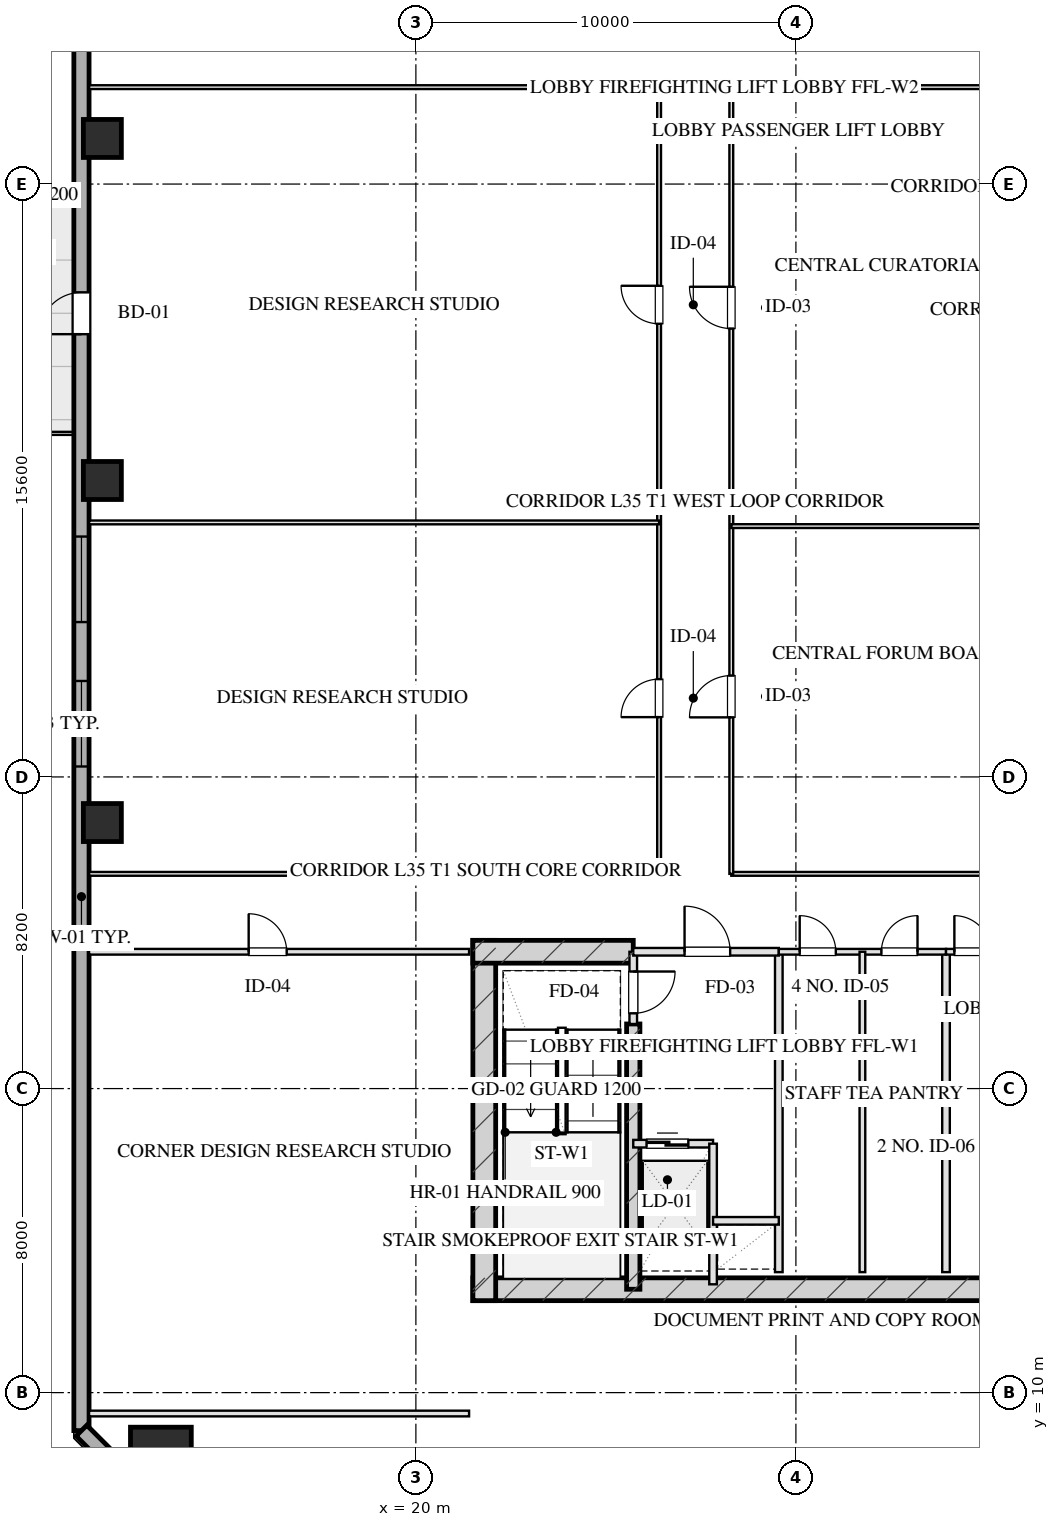
"""IFC4 building model, lengths in metres.
Left out: names, types, materials, properties, quantities, classifications, styles, units other than length and angle.
Written with IfcOpenShell. Run it as: python <this file> out.ifc"""

import sys

from ifc_helpers import new_model, si_unit, direction, frame, frame_2d, origin, origin_2d, place, context, subcontext, project, spatial, rectangle, hollow_rectangle, extrude, element, fill, save


model = new_model("IFC4")
c1 = context("Model", 3, precision=1e-05, world=origin(), true_north=direction((0.0, 1.0)))
c2 = subcontext(c1, "Body", "Model", "MODEL_VIEW")
j1 = project(units=[si_unit("LENGTHUNIT", "METRE"), si_unit("PLANEANGLEUNIT", "RADIAN")], contexts=[c1])
p1 = place(None, origin())
s1 = spatial("IfcSite", under=j1, at=p1, CompositionType="ELEMENT")
p2 = place(p1, origin())
s2 = spatial("IfcBuilding", under=s1, at=p2, CompositionType="ELEMENT")
p3 = place(p2, frame((0.0, 0.0, 134.55)))
s3 = spatial("IfcBuildingStorey", under=s2, at=p3, CompositionType="ELEMENT", Elevation=134.55)
p4 = place(p3, frame((21.5, 12.72, 0.0), z_axis=(0.0, 0.0, 1.0), x_axis=(1.0, 0.0, 0.0)))
e1 = element("IfcWall", 1, at=p4, inside=s3, PredefinedType="SHEAR", context=c2, shape_type="SweptSolid", body=[
    extrude(rectangle(XDim=17.0, YDim=0.6, at=frame_2d((8.5, 0.0))), origin(), (0.0, 0.0, 1.0), 3.45),
])
p5 = place(p3, frame((21.8, 21.9, 0.0), z_axis=(0.0, 0.0, 1.0), x_axis=(0.0, -1.0, 0.0)))
e2 = element("IfcWall", 2, at=p5, inside=s3, PredefinedType="SHEAR", context=c2, shape_type="SweptSolid", body=[
    extrude(rectangle(XDim=9.48, YDim=0.6, at=frame_2d((4.74, 0.0))), origin(), (0.0, 0.0, 1.0), 3.45),
])
p6 = place(p3, frame((25.72, 19.7, 0.0), z_axis=(0.0, 0.0, 1.0), x_axis=(0.0, -1.0, 0.0)))
e3 = element("IfcWall", 3, at=p6, inside=s3, PredefinedType="SHEAR", context=c2, shape_type="SweptSolid", body=[
    extrude(rectangle(XDim=6.98, YDim=0.35, at=frame_2d((3.49, 0.0))), origin(), (0.0, 0.0, 1.0), 3.45),
])
p7 = place(p3, frame((21.5, 21.6, 0.0), z_axis=(0.0, 0.0, 1.0), x_axis=(1.0, 0.0, 0.0)))
e4 = element("IfcWall", 4, at=p7, inside=s3, PredefinedType="SHEAR", context=c2, shape_type="SweptSolid", body=[
    extrude(rectangle(XDim=4.22, YDim=0.6, at=frame_2d((2.11, 0.0))), origin(), (0.0, 0.0, 1.0), 3.45),
])
p8 = place(p3, frame((13.29, 8.29, 0.0), z_axis=(0.0, 0.0, 1.0), x_axis=(1.0, 0.0, 0.0)))
e5 = element("IfcColumn", 5, at=p8, inside=s3, PredefinedType="COLUMN", context=c2, shape_type="SweptSolid", body=[
    extrude(hollow_rectangle(XDim=1.6, YDim=1.6, WallThickness=0.055, at=origin_2d()), origin(), (0.0, 0.0, 1.0), 3.451),
])
for number, where, z_axis, x_axis in (
    (6, (11.75, 25.0, 0.0), (0.0, 0.0, 1.0), (1.0, 0.0, 0.0)),
    (7, (11.75, 34.0, 0.0), (0.0, 0.0, 1.0), (1.0, 0.0, 0.0)),
    (8, (11.75, 43.0, 0.0), (0.0, 0.0, 1.0), (1.0, 0.0, 0.0)),
):
    element("IfcColumn", number, at=place(p3, frame(where, z_axis=z_axis, x_axis=x_axis)), inside=s3, PredefinedType="COLUMN", context=c2, shape_type="SweptSolid", body=[
        extrude(hollow_rectangle(XDim=1.0, YDim=1.0, WallThickness=0.036, at=origin_2d()), origin(), (0.0, 0.0, 1.0), 3.451),
    ])
p9 = place(p3, frame((11.2, 9.0, 0.0), z_axis=(0.0, 0.0, 1.0), x_axis=(0.0, 1.0, 0.0)))
e9 = element("IfcWall", 9, at=p9, inside=s3, PredefinedType="SOLIDWALL", context=c2, shape_type="SweptSolid", body=[
    extrude(rectangle(XDim=50.0, YDim=0.4, at=frame_2d((25.0, 0.0))), origin(), (0.0, 0.0, 1.0), 2.55),
])
p10 = place(p9, frame((17.475, 0.0, 0.75)))
e10 = element("IfcOpeningElement", 10, at=p10, cuts=e9, PredefinedType="OPENING", context=c2, shape_type="SweptSolid", body=[
    extrude(rectangle(XDim=2.25, YDim=1.4, at=frame_2d((1.125, 0.7))), frame((0.0, 0.21, 0.0), z_axis=(0.0, -1.0, 0.0), x_axis=(1.0, 0.0, 0.0)), (0.0, 0.0, 1.0), 0.42),
])
p11 = place(p9, frame((21.275, 0.0, 0.75)))
e11 = element("IfcOpeningElement", 11, at=p11, cuts=e9, PredefinedType="OPENING", context=c2, shape_type="SweptSolid", body=[
    extrude(rectangle(XDim=2.25, YDim=1.4, at=frame_2d((1.125, 0.7))), frame((0.0, 0.21, 0.0), z_axis=(0.0, -1.0, 0.0), x_axis=(1.0, 0.0, 0.0)), (0.0, 0.0, 1.0), 0.42),
])
p12 = place(p9, frame((28.85, 0.0, 0.0)))
e12 = element("IfcOpeningElement", 12, at=p12, cuts=e9, PredefinedType="OPENING", context=c2, shape_type="SweptSolid", body=[
    extrude(rectangle(XDim=1.1, YDim=2.15, at=frame_2d((0.55, 1.075))), frame((0.0, 0.21, 0.0), z_axis=(0.0, -1.0, 0.0), x_axis=(1.0, 0.0, 0.0)), (0.0, 0.0, 1.0), 0.42),
])
p13 = place(p3, frame((14.0, 6.2, 0.0), z_axis=(0.0, 0.0, 1.0), x_axis=(-0.707106781187, 0.707106781187, 0.0)))
e13 = element("IfcWall", 13, at=p13, inside=s3, PredefinedType="SOLIDWALL", context=c2, shape_type="SweptSolid", body=[
    extrude(rectangle(XDim=3.96, YDim=0.4, at=frame_2d((1.98, 0.0))), origin(), (0.0, 0.0, 1.0), 2.55),
])
p14 = place(p3, frame((25.72, 21.6, 0.0), z_axis=(0.0, 0.0, 1.0), x_axis=(0.0, -1.0, 0.0)))
e14 = element("IfcWall", 14, at=p14, inside=s3, PredefinedType="PARTITIONING", context=c2, shape_type="SweptSolid", body=[
    extrude(rectangle(XDim=1.9, YDim=0.2, at=frame_2d((0.95, 0.0))), origin(), (0.0, 0.0, 1.0), 3.155),
])
p15 = place(p14, frame((0.52, 0.0, 0.0)))
e15 = element("IfcOpeningElement", 15, at=p15, cuts=e14, PredefinedType="OPENING", context=c2, shape_type="SweptSolid", body=[
    extrude(rectangle(XDim=1.1, YDim=2.05, at=frame_2d((0.55, 1.025))), frame((0.0, 0.11, 0.0), z_axis=(0.0, -1.0, 0.0), x_axis=(1.0, 0.0, 0.0)), (0.0, 0.0, 1.0), 0.22),
])
p16 = place(p3, frame((29.55, 21.6, 0.0), z_axis=(0.0, 0.0, 1.0), x_axis=(0.0, -1.0, 0.0)))
e16 = element("IfcWall", 16, at=p16, inside=s3, PredefinedType="PARTITIONING", context=c2, shape_type="SweptSolid", body=[
    extrude(rectangle(XDim=8.43, YDim=0.2, at=frame_2d((4.215, 0.0))), origin(), (0.0, 0.0, 1.0), 3.155),
])
p17 = place(p3, frame((25.72, 21.6, 0.0), z_axis=(0.0, 0.0, 1.0), x_axis=(1.0, 0.0, 0.0)))
e17 = element("IfcWall", 17, at=p17, inside=s3, PredefinedType="PARTITIONING", context=c2, shape_type="SweptSolid", body=[
    extrude(rectangle(XDim=3.83, YDim=0.2, at=frame_2d((1.915, 0.0))), origin(), (0.0, 0.0, 1.0), 3.155),
])
p18 = place(p17, frame((1.35, 0.0, 0.0)))
e18 = element("IfcOpeningElement", 18, at=p18, cuts=e17, PredefinedType="OPENING", context=c2, shape_type="SweptSolid", body=[
    extrude(rectangle(XDim=1.2, YDim=2.05, at=frame_2d((0.6, 1.025))), frame((0.0, 0.11, 0.0), z_axis=(0.0, -1.0, 0.0), x_axis=(1.0, 0.0, 0.0)), (0.0, 0.0, 1.0), 0.22),
])
p19 = place(p3, frame((25.72, 16.55, 0.0), z_axis=(0.0, 0.0, 1.0), x_axis=(1.0, 0.0, 0.0)))
e19 = element("IfcWall", 19, at=p19, inside=s3, PredefinedType="PARTITIONING", context=c2, shape_type="SweptSolid", body=[
    extrude(rectangle(XDim=2.1, YDim=0.2, at=frame_2d((1.05, 0.0))), origin(), (0.0, 0.0, 1.0), 3.155),
])
p20 = place(p19, frame((0.35, 0.0, 0.0)))
e20 = element("IfcOpeningElement", 20, at=p20, cuts=e19, PredefinedType="OPENING", context=c2, shape_type="SweptSolid", body=[
    extrude(rectangle(XDim=1.1, YDim=2.05, at=frame_2d((0.55, 1.025))), frame((0.0, 0.11, 0.0), z_axis=(0.0, -1.0, 0.0), x_axis=(1.0, 0.0, 0.0)), (0.0, 0.0, 1.0), 0.22),
])
p21 = place(p3, frame((27.82, 16.55, 0.0), z_axis=(0.0, 0.0, 1.0), x_axis=(0.0, -1.0, 0.0)))
e21 = element("IfcWall", 21, at=p21, inside=s3, PredefinedType="PARTITIONING", context=c2, shape_type="SweptSolid", body=[
    extrude(rectangle(XDim=3.7, YDim=0.2, at=frame_2d((1.85, 0.0))), origin(), (0.0, 0.0, 1.0), 3.155),
])
p22 = place(p3, frame((27.82, 14.52, 0.0), z_axis=(0.0, 0.0, 1.0), x_axis=(1.0, 0.0, 0.0)))
e22 = element("IfcWall", 22, at=p22, inside=s3, PredefinedType="PARTITIONING", context=c2, shape_type="SweptSolid", body=[
    extrude(rectangle(XDim=1.73, YDim=0.2, at=frame_2d((0.865, 0.0))), origin(), (0.0, 0.0, 1.0), 3.155),
])
p23 = place(p3, frame((33.95, 21.6, 0.0), z_axis=(0.0, 0.0, 1.0), x_axis=(0.0, -1.0, 0.0)))
e23 = element("IfcWall", 23, at=p23, inside=s3, PredefinedType="PARTITIONING", context=c2, shape_type="SweptSolid", body=[
    extrude(rectangle(XDim=8.43, YDim=0.2, at=frame_2d((4.215, 0.0))), origin(), (0.0, 0.0, 1.0), 3.155),
])
p24 = place(p3, frame((29.55, 21.6, 0.0), z_axis=(0.0, 0.0, 1.0), x_axis=(1.0, 0.0, 0.0)))
e24 = element("IfcWall", 24, at=p24, inside=s3, PredefinedType="PARTITIONING", context=c2, shape_type="SweptSolid", body=[
    extrude(rectangle(XDim=4.4, YDim=0.15, at=frame_2d((2.2, 0.0))), origin(), (0.0, 0.0, 1.0), 3.155),
])
p25 = place(p24, frame((0.55, 0.0, 0.0)))
e25 = element("IfcOpeningElement", 25, at=p25, cuts=e24, PredefinedType="OPENING", context=c2, shape_type="SweptSolid", body=[
    extrude(rectangle(XDim=0.95, YDim=2.05, at=frame_2d((0.475, 1.025))), frame((0.0, 0.085, 0.0), z_axis=(0.0, -1.0, 0.0), x_axis=(1.0, 0.0, 0.0)), (0.0, 0.0, 1.0), 0.17),
])
p26 = place(p24, frame((2.7, 0.0, 0.0)))
e26 = element("IfcOpeningElement", 26, at=p26, cuts=e24, PredefinedType="OPENING", context=c2, shape_type="SweptSolid", body=[
    extrude(rectangle(XDim=0.95, YDim=2.05, at=frame_2d((0.475, 1.025))), frame((0.0, 0.085, 0.0), z_axis=(0.0, -1.0, 0.0), x_axis=(1.0, 0.0, 0.0)), (0.0, 0.0, 1.0), 0.17),
])
p27 = place(p3, frame((31.75, 21.6, 0.0), z_axis=(0.0, 0.0, 1.0), x_axis=(0.0, -1.0, 0.0)))
e27 = element("IfcWall", 27, at=p27, inside=s3, PredefinedType="PARTITIONING", context=c2, shape_type="SweptSolid", body=[
    extrude(rectangle(XDim=8.43, YDim=0.15, at=frame_2d((4.215, 0.0))), origin(), (0.0, 0.0, 1.0), 3.155),
])
p28 = place(p3, frame((33.95, 21.6, 0.0), z_axis=(0.0, 0.0, 1.0), x_axis=(1.0, 0.0, 0.0)))
e28 = element("IfcWall", 28, at=p28, inside=s3, PredefinedType="PARTITIONING", context=c2, shape_type="SweptSolid", body=[
    extrude(rectangle(XDim=3.8, YDim=0.15, at=frame_2d((1.9, 0.0))), origin(), (0.0, 0.0, 1.0), 3.155),
])
p29 = place(p28, frame((0.22, 0.0, 0.0)))
e29 = element("IfcOpeningElement", 29, at=p29, cuts=e28, PredefinedType="OPENING", context=c2, shape_type="SweptSolid", body=[
    extrude(rectangle(XDim=0.95, YDim=2.05, at=frame_2d((0.475, 1.025))), frame((0.0, 0.085, 0.0), z_axis=(0.0, -1.0, 0.0), x_axis=(1.0, 0.0, 0.0)), (0.0, 0.0, 1.0), 0.17),
])
p30 = place(p3, frame((11.4, 9.45, 0.0), z_axis=(0.0, 0.0, 1.0), x_axis=(1.0, 0.0, 0.0)))
e30 = element("IfcWall", 30, at=p30, inside=s3, PredefinedType="PARTITIONING", context=c2, shape_type="SweptSolid", body=[
    extrude(rectangle(XDim=10.0, YDim=0.15, at=frame_2d((5.0, 0.0))), origin(), (0.0, 0.0, 1.0), 3.155),
])
p31 = place(p3, frame((11.4, 21.6, 0.0), z_axis=(0.0, 0.0, 1.0), x_axis=(1.0, 0.0, 0.0)))
e31 = element("IfcWall", 31, at=p31, inside=s3, PredefinedType="PARTITIONING", context=c2, shape_type="SweptSolid", body=[
    extrude(rectangle(XDim=10.0, YDim=0.15, at=frame_2d((5.0, 0.0))), origin(), (0.0, 0.0, 1.0), 3.155),
])
p32 = place(p31, frame((4.2, 0.0, 0.0)))
e32 = element("IfcOpeningElement", 32, at=p32, cuts=e31, PredefinedType="OPENING", context=c2, shape_type="SweptSolid", body=[
    extrude(rectangle(XDim=1.0, YDim=2.05, at=frame_2d((0.5, 1.025))), frame((0.0, 0.085, 0.0), z_axis=(0.0, -1.0, 0.0), x_axis=(1.0, 0.0, 0.0)), (0.0, 0.0, 1.0), 0.17),
])
p33 = place(p3, frame((11.4, 23.65, 0.0), z_axis=(0.0, 0.0, 1.0), x_axis=(1.0, 0.0, 0.0)))
e33 = element("IfcWall", 33, at=p33, inside=s3, PredefinedType="MOVABLE", context=c2, shape_type="SweptSolid", body=[
    extrude(rectangle(XDim=15.0, YDim=0.1, at=frame_2d((7.5, 0.0))), origin(), (0.0, 0.0, 1.0), 3.155),
])
p34 = place(p3, frame((28.3, 23.65, 0.0), z_axis=(0.0, 0.0, 1.0), x_axis=(1.0, 0.0, 0.0)))
e34 = element("IfcWall", 34, at=p34, inside=s3, PredefinedType="MOVABLE", context=c2, shape_type="SweptSolid", body=[
    extrude(rectangle(XDim=9.2, YDim=0.1, at=frame_2d((4.6, 0.0))), origin(), (0.0, 0.0, 1.0), 3.155),
])
p35 = place(p3, frame((11.4, 44.35, 0.0), z_axis=(0.0, 0.0, 1.0), x_axis=(1.0, 0.0, 0.0)))
e35 = element("IfcWall", 35, at=p35, inside=s3, PredefinedType="MOVABLE", context=c2, shape_type="SweptSolid", body=[
    extrude(rectangle(XDim=15.0, YDim=0.1, at=frame_2d((7.5, 0.0))), origin(), (0.0, 0.0, 1.0), 3.155),
])
p36 = place(p3, frame((28.3, 44.35, 0.0), z_axis=(0.0, 0.0, 1.0), x_axis=(1.0, 0.0, 0.0)))
e36 = element("IfcWall", 36, at=p36, inside=s3, PredefinedType="MOVABLE", context=c2, shape_type="SweptSolid", body=[
    extrude(rectangle(XDim=9.2, YDim=0.1, at=frame_2d((4.6, 0.0))), origin(), (0.0, 0.0, 1.0), 3.155),
])
p37 = place(p3, frame((26.4, 23.65, 0.0), z_axis=(0.0, 0.0, 1.0), x_axis=(0.0, 1.0, 0.0)))
e37 = element("IfcWall", 37, at=p37, inside=s3, PredefinedType="MOVABLE", context=c2, shape_type="SweptSolid", body=[
    extrude(rectangle(XDim=20.7, YDim=0.1, at=frame_2d((10.35, 0.0))), origin(), (0.0, 0.0, 1.0), 3.155),
])
p38 = place(p37, frame((4.124, 0.0, 0.0)))
e38 = element("IfcOpeningElement", 38, at=p38, cuts=e37, PredefinedType="OPENING", context=c2, shape_type="SweptSolid", body=[
    extrude(rectangle(XDim=1.0, YDim=2.05, at=frame_2d((0.5, 1.025))), frame((0.0, 0.06, 0.0), z_axis=(0.0, -1.0, 0.0), x_axis=(1.0, 0.0, 0.0)), (0.0, 0.0, 1.0), 0.12),
])
p39 = place(p37, frame((14.473, 0.0, 0.0)))
e39 = element("IfcOpeningElement", 39, at=p39, cuts=e37, PredefinedType="OPENING", context=c2, shape_type="SweptSolid", body=[
    extrude(rectangle(XDim=1.0, YDim=2.05, at=frame_2d((0.5, 1.025))), frame((0.0, 0.06, 0.0), z_axis=(0.0, -1.0, 0.0), x_axis=(1.0, 0.0, 0.0)), (0.0, 0.0, 1.0), 0.12),
])
p40 = place(p3, frame((28.3, 23.65, 0.0), z_axis=(0.0, 0.0, 1.0), x_axis=(0.0, 1.0, 0.0)))
e40 = element("IfcWall", 40, at=p40, inside=s3, PredefinedType="MOVABLE", context=c2, shape_type="SweptSolid", body=[
    extrude(rectangle(XDim=20.7, YDim=0.1, at=frame_2d((10.35, 0.0))), origin(), (0.0, 0.0, 1.0), 3.155),
])
p41 = place(p40, frame((4.117, 0.0, 0.0)))
e41 = element("IfcOpeningElement", 41, at=p41, cuts=e40, PredefinedType="OPENING", context=c2, shape_type="SweptSolid", body=[
    extrude(rectangle(XDim=1.1, YDim=2.05, at=frame_2d((0.55, 1.025))), frame((0.0, 0.06, 0.0), z_axis=(0.0, -1.0, 0.0), x_axis=(1.0, 0.0, 0.0)), (0.0, 0.0, 1.0), 0.12),
])
p42 = place(p40, frame((14.347, 0.0, 0.0)))
e42 = element("IfcOpeningElement", 42, at=p42, cuts=e40, PredefinedType="OPENING", context=c2, shape_type="SweptSolid", body=[
    extrude(rectangle(XDim=1.1, YDim=2.05, at=frame_2d((0.55, 1.025))), frame((0.0, 0.06, 0.0), z_axis=(0.0, -1.0, 0.0), x_axis=(1.0, 0.0, 0.0)), (0.0, 0.0, 1.0), 0.12),
])
p43 = place(p3, frame((28.3, 32.8, 0.0), z_axis=(0.0, 0.0, 1.0), x_axis=(1.0, 0.0, 0.0)))
e43 = element("IfcWall", 43, at=p43, inside=s3, PredefinedType="MOVABLE", context=c2, shape_type="SweptSolid", body=[
    extrude(rectangle(XDim=9.2, YDim=0.1, at=frame_2d((4.6, 0.0))), origin(), (0.0, 0.0, 1.0), 3.155),
])
p44 = place(p3, frame((11.4, 32.897, 0.0), z_axis=(0.0, 0.0, 1.0), x_axis=(1.0, 0.0, 0.0)))
e44 = element("IfcWall", 44, at=p44, inside=s3, PredefinedType="MOVABLE", context=c2, shape_type="SweptSolid", body=[
    extrude(rectangle(XDim=15.0, YDim=0.1, at=frame_2d((7.5, 0.0))), origin(), (0.0, 0.0, 1.0), 3.155),
])
p45 = place(p10, origin())
e45 = element("IfcWindow", 45, at=p45, inside=s3, PartitioningType="TRIPLE_PANEL_VERTICAL", PredefinedType="WINDOW", context=c2, shape_type="SweptSolid", body=[
    extrude(rectangle(XDim=2.25, YDim=1.4, at=frame_2d((1.125, 0.7))), frame((0.0, 0.03, 0.0), z_axis=(0.0, -1.0, 0.0), x_axis=(1.0, 0.0, 0.0)), (0.0, 0.0, 1.0), 0.06),
])
fill(e10, e45)
p46 = place(p11, origin())
e46 = element("IfcWindow", 46, at=p46, inside=s3, PartitioningType="TRIPLE_PANEL_VERTICAL", PredefinedType="WINDOW", context=c2, shape_type="SweptSolid", body=[
    extrude(rectangle(XDim=2.25, YDim=1.4, at=frame_2d((1.125, 0.7))), frame((0.0, 0.03, 0.0), z_axis=(0.0, -1.0, 0.0), x_axis=(1.0, 0.0, 0.0)), (0.0, 0.0, 1.0), 0.06),
])
fill(e11, e46)
p47 = place(p12, origin())
e47 = element("IfcDoor", 47, at=p47, inside=s3, OperationType="SINGLE_SWING_LEFT", PredefinedType="DOOR", context=c2, shape_type="SweptSolid", body=[
    extrude(rectangle(XDim=1.1, YDim=2.15, at=frame_2d((0.55, 1.075))), frame((0.0, 0.025, 0.0), z_axis=(0.0, -1.0, 0.0), x_axis=(1.0, 0.0, 0.0)), (0.0, 0.0, 1.0), 0.05),
])
fill(e12, e47)
p48 = place(p15, origin())
e48 = element("IfcDoor", 48, at=p48, inside=s3, OperationType="SINGLE_SWING_LEFT", PredefinedType="DOOR", context=c2, shape_type="SweptSolid", body=[
    extrude(rectangle(XDim=1.1, YDim=2.05, at=frame_2d((0.55, 1.025))), frame((0.0, 0.025, 0.0), z_axis=(0.0, -1.0, 0.0), x_axis=(1.0, 0.0, 0.0)), (0.0, 0.0, 1.0), 0.05),
])
fill(e15, e48)
p49 = place(p18, origin())
e49 = element("IfcDoor", 49, at=p49, inside=s3, OperationType="SINGLE_SWING_LEFT", PredefinedType="DOOR", context=c2, shape_type="SweptSolid", body=[
    extrude(rectangle(XDim=1.2, YDim=2.05, at=frame_2d((0.6, 1.025))), frame((0.0, 0.025, 0.0), z_axis=(0.0, -1.0, 0.0), x_axis=(1.0, 0.0, 0.0)), (0.0, 0.0, 1.0), 0.05),
])
fill(e18, e49)
p50 = place(p20, origin())
e50 = element("IfcDoor", 50, at=p50, inside=s3, OperationType="DOUBLE_DOOR_SLIDING", PredefinedType="DOOR", context=c2, shape_type="SweptSolid", body=[
    extrude(rectangle(XDim=1.1, YDim=2.05, at=frame_2d((0.55, 1.025))), frame((0.0, 0.025, 0.0), z_axis=(0.0, -1.0, 0.0), x_axis=(1.0, 0.0, 0.0)), (0.0, 0.0, 1.0), 0.05),
])
fill(e20, e50)
p51 = place(p25, origin())
e51 = element("IfcDoor", 51, at=p51, inside=s3, OperationType="SINGLE_SWING_LEFT", PredefinedType="DOOR", context=c2, shape_type="SweptSolid", body=[
    extrude(rectangle(XDim=0.95, YDim=2.05, at=frame_2d((0.475, 1.025))), frame((0.0, 0.025, 0.0), z_axis=(0.0, -1.0, 0.0), x_axis=(1.0, 0.0, 0.0)), (0.0, 0.0, 1.0), 0.05),
])
fill(e25, e51)
p52 = place(p26, origin())
e52 = element("IfcDoor", 52, at=p52, inside=s3, OperationType="SINGLE_SWING_RIGHT", PredefinedType="DOOR", context=c2, shape_type="SweptSolid", body=[
    extrude(rectangle(XDim=0.95, YDim=2.05, at=frame_2d((0.475, 1.025))), frame((0.0, 0.025, 0.0), z_axis=(0.0, -1.0, 0.0), x_axis=(1.0, 0.0, 0.0)), (0.0, 0.0, 1.0), 0.05),
])
fill(e26, e52)
p53 = place(p29, origin())
e53 = element("IfcDoor", 53, at=p53, inside=s3, OperationType="SINGLE_SWING_LEFT", PredefinedType="DOOR", context=c2, shape_type="SweptSolid", body=[
    extrude(rectangle(XDim=0.95, YDim=2.05, at=frame_2d((0.475, 1.025))), frame((0.0, 0.025, 0.0), z_axis=(0.0, -1.0, 0.0), x_axis=(1.0, 0.0, 0.0)), (0.0, 0.0, 1.0), 0.05),
])
fill(e29, e53)
p54 = place(p32, origin())
e54 = element("IfcDoor", 54, at=p54, inside=s3, OperationType="SINGLE_SWING_LEFT", PredefinedType="DOOR", context=c2, shape_type="SweptSolid", body=[
    extrude(rectangle(XDim=1.0, YDim=2.05, at=frame_2d((0.5, 1.025))), frame((0.0, 0.025, 0.0), z_axis=(0.0, -1.0, 0.0), x_axis=(1.0, 0.0, 0.0)), (0.0, 0.0, 1.0), 0.05),
])
fill(e32, e54)
p55 = place(p38, origin())
e55 = element("IfcDoor", 55, at=p55, inside=s3, OperationType="SINGLE_SWING_LEFT", PredefinedType="DOOR", context=c2, shape_type="SweptSolid", body=[
    extrude(rectangle(XDim=1.0, YDim=2.05, at=frame_2d((0.5, 1.025))), frame((0.0, 0.025, 0.0), z_axis=(0.0, -1.0, 0.0), x_axis=(1.0, 0.0, 0.0)), (0.0, 0.0, 1.0), 0.05),
])
fill(e38, e55)
p56 = place(p39, origin())
e56 = element("IfcDoor", 56, at=p56, inside=s3, OperationType="SINGLE_SWING_RIGHT", PredefinedType="DOOR", context=c2, shape_type="SweptSolid", body=[
    extrude(rectangle(XDim=1.0, YDim=2.05, at=frame_2d((0.5, 1.025))), frame((0.0, 0.025, 0.0), z_axis=(0.0, -1.0, 0.0), x_axis=(1.0, 0.0, 0.0)), (0.0, 0.0, 1.0), 0.05),
])
fill(e39, e56)
p57 = place(p41, origin())
e57 = element("IfcDoor", 57, at=p57, inside=s3, OperationType="SINGLE_SWING_LEFT", PredefinedType="DOOR", context=c2, shape_type="SweptSolid", body=[
    extrude(rectangle(XDim=1.1, YDim=2.05, at=frame_2d((0.55, 1.025))), frame((0.0, 0.025, 0.0), z_axis=(0.0, -1.0, 0.0), x_axis=(1.0, 0.0, 0.0)), (0.0, 0.0, 1.0), 0.05),
])
fill(e41, e57)
p58 = place(p42, origin())
e58 = element("IfcDoor", 58, at=p58, inside=s3, OperationType="SINGLE_SWING_RIGHT", PredefinedType="DOOR", context=c2, shape_type="SweptSolid", body=[
    extrude(rectangle(XDim=1.1, YDim=2.05, at=frame_2d((0.55, 1.025))), frame((0.0, 0.025, 0.0), z_axis=(0.0, -1.0, 0.0), x_axis=(1.0, 0.0, 0.0)), (0.0, 0.0, 1.0), 0.05),
])
fill(e42, e58)
save(model, sys.argv[1])
